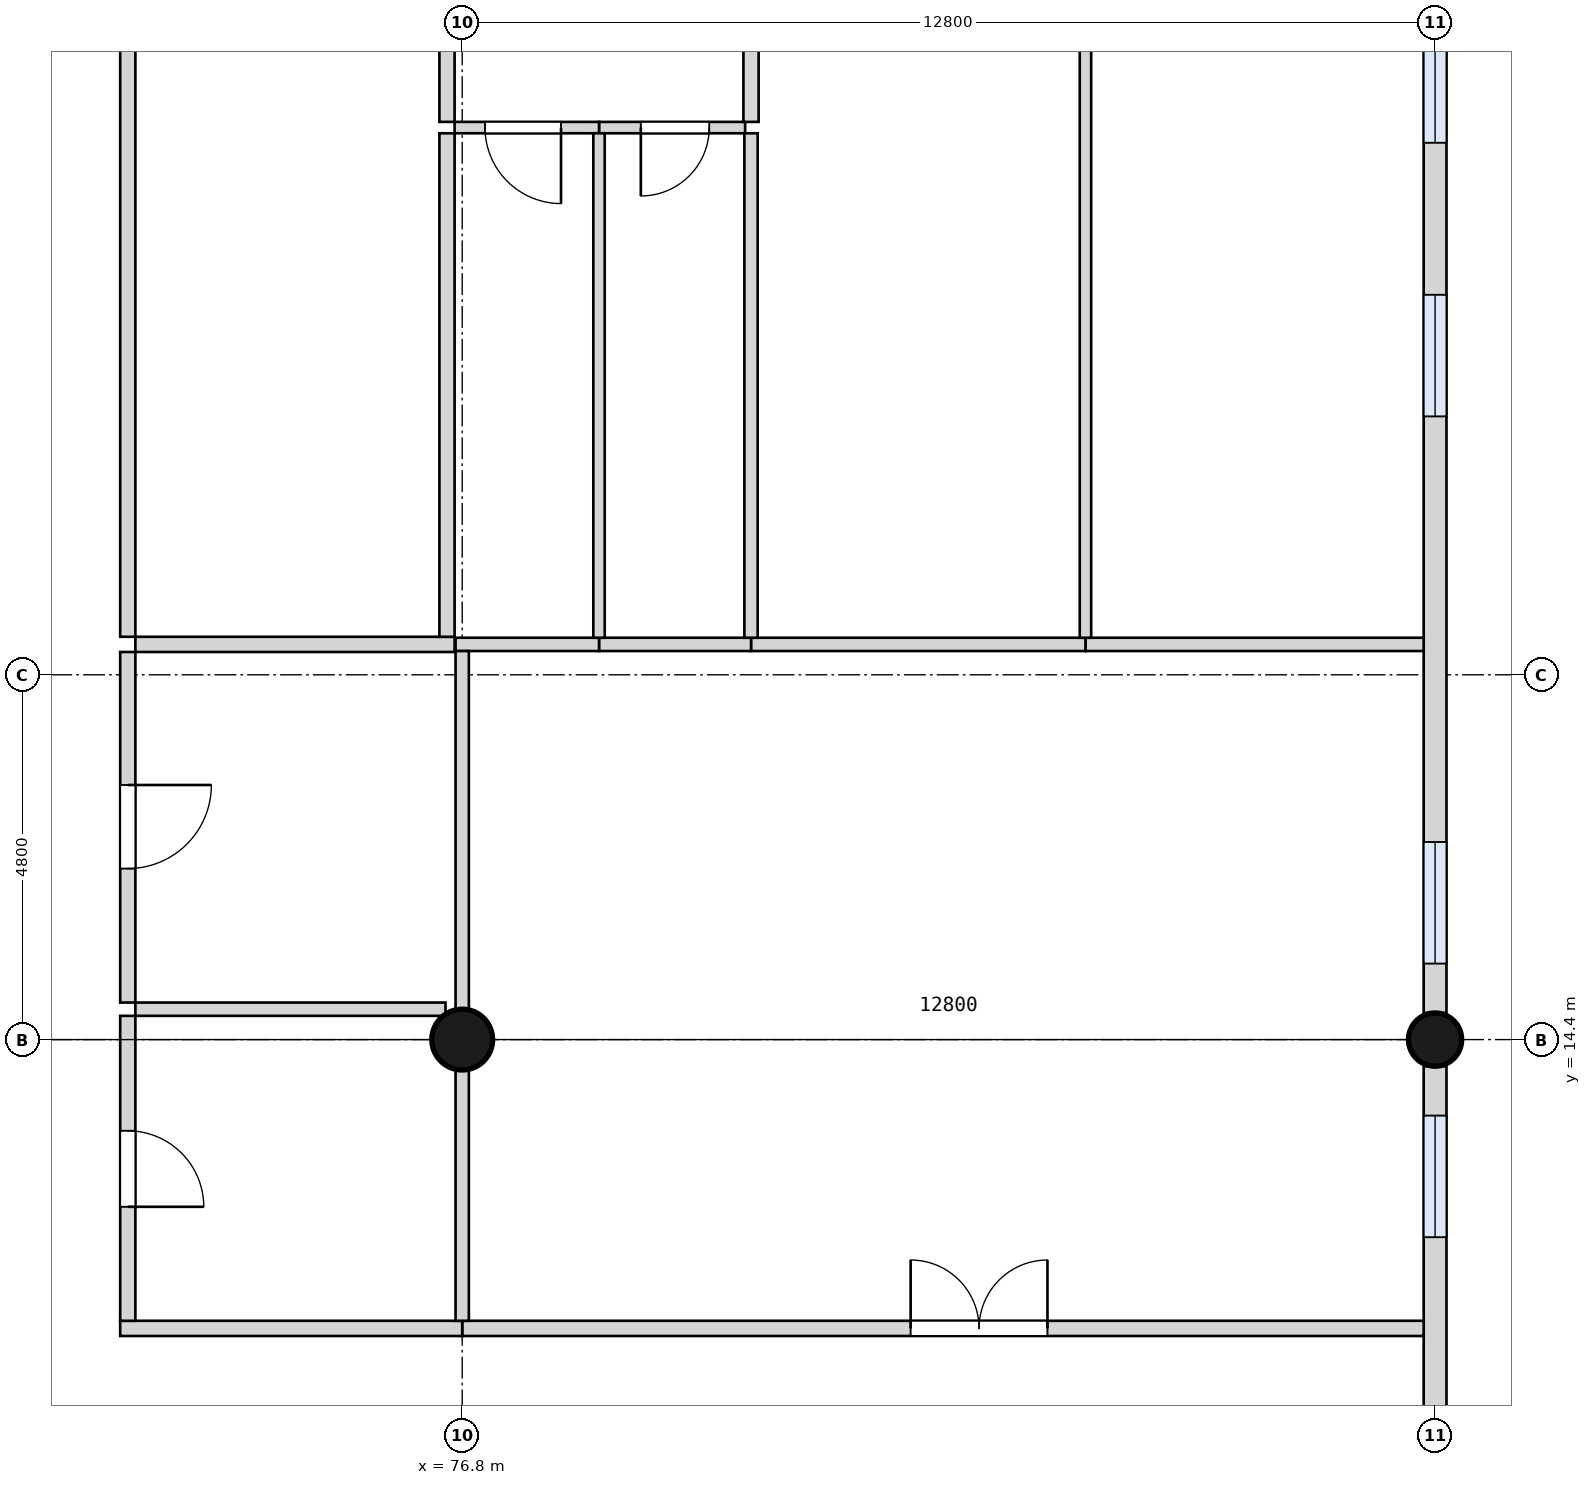
"""IFC4 building model, lengths in metres.
Left out: names, types, materials, properties, quantities, classifications, styles, units other than length and angle.
Written with IfcOpenShell. Run it as: python <this file> out.ifc"""

import sys

from ifc_helpers import new_model, si_unit, direction, frame, frame_2d, origin, origin_2d, place, context, subcontext, project, spatial, rectangle, circle, extrude, element, fill, save


model = new_model("IFC4")
c1 = context("Model", 3, precision=1e-05, world=origin(), true_north=direction((0.0, 1.0)))
c2 = subcontext(c1, "Body", "Model", "MODEL_VIEW")
j1 = project(units=[si_unit("LENGTHUNIT", "METRE"), si_unit("PLANEANGLEUNIT", "RADIAN")], contexts=[c1])
p1 = place(None, origin())
s1 = spatial("IfcSite", under=j1, at=p1, CompositionType="ELEMENT")
p2 = place(p1, origin())
s2 = spatial("IfcBuilding", under=s1, at=p2, CompositionType="ELEMENT")
p3 = place(p2, origin())
s3 = spatial("IfcBuildingStorey", under=s2, at=p3, CompositionType="ELEMENT", Elevation=0.0)
p4 = place(p3, frame((89.6, 14.4, 0.0), z_axis=(0.0, 0.0, 1.0), x_axis=(1.0, 0.0, 0.0)))
e1 = element("IfcColumn", 1, at=p4, inside=s3, PredefinedType="COLUMN", context=c2, shape_type="SweptSolid", body=[
    extrude(circle(Radius=0.35, at=origin_2d()), origin(), (0.0, 0.0, 1.0), 4.2),
])
p5 = place(p3, frame((76.8, 14.4, 0.0), z_axis=(0.0, 0.0, 1.0), x_axis=(1.0, 0.0, 0.0)))
e2 = element("IfcColumn", 2, at=p5, inside=s3, PredefinedType="COLUMN", context=c2, shape_type="SweptSolid", body=[
    extrude(circle(Radius=0.4, at=origin_2d()), origin(), (0.0, 0.0, 1.0), 4.2),
])
p6 = place(p3, frame((89.6, 0.35, 0.0), z_axis=(0.0, 0.0, 1.0), x_axis=(0.0, 1.0, 0.0)))
e3 = element("IfcWall", 3, at=p6, inside=s3, PredefinedType="SOLIDWALL", context=c2, shape_type="SweptSolid", body=[
    extrude(rectangle(XDim=13.7, YDim=0.3, at=frame_2d((6.85, 0.0))), origin(), (0.0, 0.0, 1.0), 3.0),
])
p7 = place(p6, frame((0.65, 0.0, 0.3)))
e4 = element("IfcOpeningElement", 4, at=p7, cuts=e3, PredefinedType="OPENING", context=c2, shape_type="SweptSolid", body=[
    extrude(rectangle(XDim=1.6, YDim=2.4, at=frame_2d((0.8, 1.2))), frame((0.0, 0.16, 0.0), z_axis=(0.0, -1.0, 0.0), x_axis=(1.0, 0.0, 0.0)), (0.0, 0.0, 1.0), 0.32),
])
p8 = place(p6, frame((4.25, 0.0, 0.3)))
e5 = element("IfcOpeningElement", 5, at=p8, cuts=e3, PredefinedType="OPENING", context=c2, shape_type="SweptSolid", body=[
    extrude(rectangle(XDim=1.6, YDim=2.4, at=frame_2d((0.8, 1.2))), frame((0.0, 0.16, 0.0), z_axis=(0.0, -1.0, 0.0), x_axis=(1.0, 0.0, 0.0)), (0.0, 0.0, 1.0), 0.32),
])
p9 = place(p6, frame((11.45, 0.0, 0.3)))
e6 = element("IfcOpeningElement", 6, at=p9, cuts=e3, PredefinedType="OPENING", context=c2, shape_type="SweptSolid", body=[
    extrude(rectangle(XDim=1.6, YDim=2.4, at=frame_2d((0.8, 1.2))), frame((0.0, 0.16, 0.0), z_axis=(0.0, -1.0, 0.0), x_axis=(1.0, 0.0, 0.0)), (0.0, 0.0, 1.0), 0.32),
])
p10 = place(p3, frame((89.6, 14.75, 0.0), z_axis=(0.0, 0.0, 1.0), x_axis=(0.0, 1.0, 0.0)))
e7 = element("IfcWall", 7, at=p10, inside=s3, PredefinedType="SOLIDWALL", context=c2, shape_type="SweptSolid", body=[
    extrude(rectangle(XDim=13.7, YDim=0.3, at=frame_2d((6.85, 0.0))), origin(), (0.0, 0.0, 1.0), 3.0),
])
p11 = place(p10, frame((0.65, 0.0, 0.3)))
e8 = element("IfcOpeningElement", 8, at=p11, cuts=e7, PredefinedType="OPENING", context=c2, shape_type="SweptSolid", body=[
    extrude(rectangle(XDim=1.6, YDim=2.4, at=frame_2d((0.8, 1.2))), frame((0.0, 0.16, 0.0), z_axis=(0.0, -1.0, 0.0), x_axis=(1.0, 0.0, 0.0)), (0.0, 0.0, 1.0), 0.32),
])
p12 = place(p10, frame((7.85, 0.0, 0.3)))
e9 = element("IfcOpeningElement", 9, at=p12, cuts=e7, PredefinedType="OPENING", context=c2, shape_type="SweptSolid", body=[
    extrude(rectangle(XDim=1.6, YDim=2.4, at=frame_2d((0.8, 1.2))), frame((0.0, 0.16, 0.0), z_axis=(0.0, -1.0, 0.0), x_axis=(1.0, 0.0, 0.0)), (0.0, 0.0, 1.0), 0.32),
])
p13 = place(p10, frame((11.45, 0.0, 0.3)))
e10 = element("IfcOpeningElement", 10, at=p13, cuts=e7, PredefinedType="OPENING", context=c2, shape_type="SweptSolid", body=[
    extrude(rectangle(XDim=1.6, YDim=2.4, at=frame_2d((0.8, 1.2))), frame((0.0, 0.16, 0.0), z_axis=(0.0, -1.0, 0.0), x_axis=(1.0, 0.0, 0.0)), (0.0, 0.0, 1.0), 0.32),
])
p14 = place(p3, frame((89.45, 10.6, 0.0), z_axis=(0.0, 0.0, 1.0), x_axis=(-1.0, 0.0, 0.0)))
e11 = element("IfcWall", 11, at=p14, inside=s3, PredefinedType="PARTITIONING", context=c2, shape_type="SweptSolid", body=[
    extrude(rectangle(XDim=12.65, YDim=0.2, at=frame_2d((6.325, 0.0))), origin(), (0.0, 0.0, 1.0), 3.9),
])
p15 = place(p14, frame((4.95, 0.0, 0.0)))
e12 = element("IfcOpeningElement", 12, at=p15, cuts=e11, PredefinedType="OPENING", context=c2, shape_type="SweptSolid", body=[
    extrude(rectangle(XDim=1.8, YDim=2.1, at=frame_2d((0.9, 1.05))), frame((0.0, 0.11, 0.0), z_axis=(0.0, -1.0, 0.0), x_axis=(1.0, 0.0, 0.0)), (0.0, 0.0, 1.0), 0.22),
])
p16 = place(p3, frame((76.8, 10.6, 0.0), z_axis=(0.0, 0.0, 1.0), x_axis=(-1.0, 0.0, 0.0)))
e13 = element("IfcWall", 13, at=p16, inside=s3, PredefinedType="PARTITIONING", context=c2, shape_type="SweptSolid", body=[
    extrude(rectangle(XDim=4.5, YDim=0.2, at=frame_2d((2.25, 0.0))), origin(), (0.0, 0.0, 1.0), 3.9),
])
p17 = place(p3, frame((76.581, 14.8, 0.0), z_axis=(0.0, 0.0, 1.0), x_axis=(-1.0, 0.0, 0.0)))
e14 = element("IfcWall", 14, at=p17, inside=s3, PredefinedType="PARTITIONING", context=c2, shape_type="SweptSolid", body=[
    extrude(rectangle(XDim=4.081, YDim=0.175, at=frame_2d((2.04, 0.0))), origin(), (0.0, 0.0, 1.0), 3.9),
])
p18 = place(p3, frame((89.45, 19.6, 0.0), z_axis=(0.0, 0.0, 1.0), x_axis=(-1.0, 0.0, 0.0)))
e15 = element("IfcWall", 15, at=p18, inside=s3, PredefinedType="PARTITIONING", context=c2, shape_type="SweptSolid", body=[
    extrude(rectangle(XDim=4.45, YDim=0.175, at=frame_2d((2.225, 0.0))), origin(), (0.0, 0.0, 1.0), 3.9),
])
p19 = place(p3, frame((85.0, 19.6, 0.0), z_axis=(0.0, 0.0, 1.0), x_axis=(-1.0, 0.0, 0.0)))
e16 = element("IfcWall", 16, at=p19, inside=s3, PredefinedType="PARTITIONING", context=c2, shape_type="SweptSolid", body=[
    extrude(rectangle(XDim=4.4, YDim=0.175, at=frame_2d((2.2, 0.0))), origin(), (0.0, 0.0, 1.0), 3.9),
])
p20 = place(p3, frame((80.6, 19.6, 0.0), z_axis=(0.0, 0.0, 1.0), x_axis=(-1.0, 0.0, 0.0)))
e17 = element("IfcWall", 17, at=p20, inside=s3, PredefinedType="PARTITIONING", context=c2, shape_type="SweptSolid", body=[
    extrude(rectangle(XDim=2.0, YDim=0.175, at=frame_2d((1.0, 0.0))), origin(), (0.0, 0.0, 1.0), 3.9),
])
p21 = place(p3, frame((78.6, 19.6, 0.0), z_axis=(0.0, 0.0, 1.0), x_axis=(-1.0, 0.0, 0.0)))
e18 = element("IfcWall", 18, at=p21, inside=s3, PredefinedType="PARTITIONING", context=c2, shape_type="SweptSolid", body=[
    extrude(rectangle(XDim=1.888, YDim=0.175, at=frame_2d((0.944, 0.0))), origin(), (0.0, 0.0, 1.0), 3.9),
])
p22 = place(p3, frame((76.7, 19.6, 0.0), z_axis=(0.0, 0.0, 1.0), x_axis=(-1.0, 0.0, 0.0)))
e19 = element("IfcWall", 19, at=p22, inside=s3, PredefinedType="PARTITIONING", context=c2, shape_type="SweptSolid", body=[
    extrude(rectangle(XDim=4.2, YDim=0.2, at=frame_2d((2.1, 0.0))), origin(), (0.0, 0.0, 1.0), 3.9),
])
p23 = place(p3, frame((80.522, 26.4, 0.0), z_axis=(0.0, 0.0, 1.0), x_axis=(-1.0, 0.0, 0.0)))
e20 = element("IfcWall", 20, at=p23, inside=s3, PredefinedType="PARTITIONING", context=c2, shape_type="SweptSolid", body=[
    extrude(rectangle(XDim=1.922, YDim=0.15, at=frame_2d((0.961, 0.0))), origin(), (0.0, 0.0, 1.0), 3.9),
])
p24 = place(p23, frame((0.472, 0.0, 0.0)))
e21 = element("IfcOpeningElement", 21, at=p24, cuts=e20, PredefinedType="OPENING", context=c2, shape_type="SweptSolid", body=[
    extrude(rectangle(XDim=0.9, YDim=2.1, at=frame_2d((0.45, 1.05))), frame((0.0, 0.085, 0.0), z_axis=(0.0, -1.0, 0.0), x_axis=(1.0, 0.0, 0.0)), (0.0, 0.0, 1.0), 0.17),
])
p25 = place(p3, frame((78.6, 26.4, 0.0), z_axis=(0.0, 0.0, 1.0), x_axis=(-1.0, 0.0, 0.0)))
e22 = element("IfcWall", 22, at=p25, inside=s3, PredefinedType="PARTITIONING", context=c2, shape_type="SweptSolid", body=[
    extrude(rectangle(XDim=1.9, YDim=0.15, at=frame_2d((0.95, 0.0))), origin(), (0.0, 0.0, 1.0), 3.9),
])
p26 = place(p25, frame((0.5, 0.0, 0.0)))
e23 = element("IfcOpeningElement", 23, at=p26, cuts=e22, PredefinedType="OPENING", context=c2, shape_type="SweptSolid", body=[
    extrude(rectangle(XDim=1.0, YDim=2.1, at=frame_2d((0.5, 1.05))), frame((0.0, 0.085, 0.0), z_axis=(0.0, -1.0, 0.0), x_axis=(1.0, 0.0, 0.0)), (0.0, 0.0, 1.0), 0.17),
])
p27 = place(p3, frame((85.0, 19.688, 0.0), z_axis=(0.0, 0.0, 1.0), x_axis=(0.0, 1.0, 0.0)))
e24 = element("IfcWall", 24, at=p27, inside=s3, PredefinedType="PARTITIONING", context=c2, shape_type="SweptSolid", body=[
    extrude(rectangle(XDim=9.012, YDim=0.15, at=frame_2d((4.506, 0.0))), origin(), (0.0, 0.0, 1.0), 3.9),
])
p28 = place(p3, frame((80.6, 19.688, 0.0), z_axis=(0.0, 0.0, 1.0), x_axis=(0.0, 1.0, 0.0)))
e25 = element("IfcWall", 25, at=p28, inside=s3, PredefinedType="PARTITIONING", context=c2, shape_type="SweptSolid", body=[
    extrude(rectangle(XDim=6.637, YDim=0.175, at=frame_2d((3.319, 0.0))), origin(), (0.0, 0.0, 1.0), 3.9),
])
p29 = place(p3, frame((80.6, 26.475, 0.0), z_axis=(0.0, 0.0, 1.0), x_axis=(0.0, 1.0, 0.0)))
e26 = element("IfcWall", 26, at=p29, inside=s3, PredefinedType="PARTITIONING", context=c2, shape_type="SweptSolid", body=[
    extrude(rectangle(XDim=2.225, YDim=0.2, at=frame_2d((1.112, 0.0))), origin(), (0.0, 0.0, 1.0), 3.9),
])
p30 = place(p3, frame((78.6, 19.688, 0.0), z_axis=(0.0, 0.0, 1.0), x_axis=(0.0, 1.0, 0.0)))
e27 = element("IfcWall", 27, at=p30, inside=s3, PredefinedType="PARTITIONING", context=c2, shape_type="SweptSolid", body=[
    extrude(rectangle(XDim=6.637, YDim=0.15, at=frame_2d((3.319, 0.0))), origin(), (0.0, 0.0, 1.0), 3.9),
])
p31 = place(p3, frame((76.8, 10.7, 0.0), z_axis=(0.0, 0.0, 1.0), x_axis=(0.0, 1.0, 0.0)))
e28 = element("IfcWall", 28, at=p31, inside=s3, PredefinedType="PARTITIONING", context=c2, shape_type="SweptSolid", body=[
    extrude(rectangle(XDim=3.3, YDim=0.175, at=frame_2d((1.65, 0.0))), origin(), (0.0, 0.0, 1.0), 3.0),
])
p32 = place(p3, frame((76.8, 14.8, 0.0), z_axis=(0.0, 0.0, 1.0), x_axis=(0.0, 1.0, 0.0)))
e29 = element("IfcWall", 29, at=p32, inside=s3, PredefinedType="PARTITIONING", context=c2, shape_type="SweptSolid", body=[
    extrude(rectangle(XDim=4.712, YDim=0.175, at=frame_2d((2.356, 0.0))), origin(), (0.0, 0.0, 1.0), 3.0),
])
p33 = place(p3, frame((76.6, 19.7, 0.0), z_axis=(0.0, 0.0, 1.0), x_axis=(0.0, 1.0, 0.0)))
e30 = element("IfcWall", 30, at=p33, inside=s3, PredefinedType="PARTITIONING", context=c2, shape_type="SweptSolid", body=[
    extrude(rectangle(XDim=6.625, YDim=0.2, at=frame_2d((3.312, 0.0))), origin(), (0.0, 0.0, 1.0), 3.0),
])
p34 = place(p3, frame((76.6, 26.475, 0.0), z_axis=(0.0, 0.0, 1.0), x_axis=(0.0, 1.0, 0.0)))
e31 = element("IfcWall", 31, at=p34, inside=s3, PredefinedType="PARTITIONING", context=c2, shape_type="SweptSolid", body=[
    extrude(rectangle(XDim=1.968, YDim=0.2, at=frame_2d((0.984, 0.0))), origin(), (0.0, 0.0, 1.0), 3.0),
])
p35 = place(p3, frame((72.4, 10.7, 0.0), z_axis=(0.0, 0.0, 1.0), x_axis=(0.0, 1.0, 0.0)))
e32 = element("IfcWall", 32, at=p35, inside=s3, PredefinedType="PARTITIONING", context=c2, shape_type="SweptSolid", body=[
    extrude(rectangle(XDim=4.012, YDim=0.2, at=frame_2d((2.006, 0.0))), origin(), (0.0, 0.0, 1.0), 3.9),
])
p36 = place(p35, frame((1.5, 0.0, 0.0)))
e33 = element("IfcOpeningElement", 33, at=p36, cuts=e32, PredefinedType="OPENING", context=c2, shape_type="SweptSolid", body=[
    extrude(rectangle(XDim=1.0, YDim=2.1, at=frame_2d((0.5, 1.05))), frame((0.0, 0.11, 0.0), z_axis=(0.0, -1.0, 0.0), x_axis=(1.0, 0.0, 0.0)), (0.0, 0.0, 1.0), 0.22),
])
p37 = place(p3, frame((72.4, 14.887, 0.0), z_axis=(0.0, 0.0, 1.0), x_axis=(0.0, 1.0, 0.0)))
e34 = element("IfcWall", 34, at=p37, inside=s3, PredefinedType="PARTITIONING", context=c2, shape_type="SweptSolid", body=[
    extrude(rectangle(XDim=4.613, YDim=0.2, at=frame_2d((2.306, 0.0))), origin(), (0.0, 0.0, 1.0), 3.9),
])
p38 = place(p37, frame((1.762, 0.0, 0.0)))
e35 = element("IfcOpeningElement", 35, at=p38, cuts=e34, PredefinedType="OPENING", context=c2, shape_type="SweptSolid", body=[
    extrude(rectangle(XDim=1.1, YDim=2.1, at=frame_2d((0.55, 1.05))), frame((0.0, 0.11, 0.0), z_axis=(0.0, -1.0, 0.0), x_axis=(1.0, 0.0, 0.0)), (0.0, 0.0, 1.0), 0.22),
])
p39 = place(p3, frame((72.4, 19.7, 0.0), z_axis=(0.0, 0.0, 1.0), x_axis=(0.0, 1.0, 0.0)))
e36 = element("IfcWall", 36, at=p39, inside=s3, PredefinedType="PARTITIONING", context=c2, shape_type="SweptSolid", body=[
    extrude(rectangle(XDim=9.0, YDim=0.2, at=frame_2d((4.5, 0.0))), origin(), (0.0, 0.0, 1.0), 3.9),
])
p40 = place(p15, frame((1.8, 0.0, 0.0), z_axis=(0.0, 0.0, 1.0), x_axis=(-1.0, 0.0, 0.0)))
e37 = element("IfcDoor", 37, at=p40, inside=s3, OperationType="DOUBLE_DOOR_SINGLE_SWING", PredefinedType="DOOR", context=c2, shape_type="SweptSolid", body=[
    extrude(rectangle(XDim=1.8, YDim=2.1, at=frame_2d((0.9, 1.05))), frame((0.0, 0.025, 0.0), z_axis=(0.0, -1.0, 0.0), x_axis=(1.0, 0.0, 0.0)), (0.0, 0.0, 1.0), 0.05),
])
fill(e12, e37)
p41 = place(p36, frame((1.0, 0.0, 0.0), z_axis=(0.0, 0.0, 1.0), x_axis=(-1.0, 0.0, 0.0)))
e38 = element("IfcDoor", 38, at=p41, inside=s3, OperationType="SINGLE_SWING_RIGHT", PredefinedType="DOOR", context=c2, shape_type="SweptSolid", body=[
    extrude(rectangle(XDim=1.0, YDim=2.1, at=frame_2d((0.5, 1.05))), frame((0.0, 0.025, 0.0), z_axis=(0.0, -1.0, 0.0), x_axis=(1.0, 0.0, 0.0)), (0.0, 0.0, 1.0), 0.05),
])
fill(e33, e38)
p42 = place(p38, frame((1.1, 0.0, 0.0), z_axis=(0.0, 0.0, 1.0), x_axis=(-1.0, 0.0, 0.0)))
e39 = element("IfcDoor", 39, at=p42, inside=s3, OperationType="SINGLE_SWING_LEFT", PredefinedType="DOOR", context=c2, shape_type="SweptSolid", body=[
    extrude(rectangle(XDim=1.1, YDim=2.1, at=frame_2d((0.55, 1.05))), frame((0.0, 0.025, 0.0), z_axis=(0.0, -1.0, 0.0), x_axis=(1.0, 0.0, 0.0)), (0.0, 0.0, 1.0), 0.05),
])
fill(e35, e39)
p43 = place(p24, origin())
e40 = element("IfcDoor", 40, at=p43, inside=s3, OperationType="SINGLE_SWING_RIGHT", PredefinedType="DOOR", context=c2, shape_type="SweptSolid", body=[
    extrude(rectangle(XDim=0.9, YDim=2.1, at=frame_2d((0.45, 1.05))), frame((0.0, 0.025, 0.0), z_axis=(0.0, -1.0, 0.0), x_axis=(1.0, 0.0, 0.0)), (0.0, 0.0, 1.0), 0.05),
])
fill(e21, e40)
p44 = place(p26, origin())
e41 = element("IfcDoor", 41, at=p44, inside=s3, OperationType="SINGLE_SWING_LEFT", PredefinedType="DOOR", context=c2, shape_type="SweptSolid", body=[
    extrude(rectangle(XDim=1.0, YDim=2.1, at=frame_2d((0.5, 1.05))), frame((0.0, 0.025, 0.0), z_axis=(0.0, -1.0, 0.0), x_axis=(1.0, 0.0, 0.0)), (0.0, 0.0, 1.0), 0.05),
])
fill(e23, e41)
p45 = place(p9, origin())
e42 = element("IfcWindow", 42, at=p45, inside=s3, PartitioningType="SINGLE_PANEL", PredefinedType="WINDOW", context=c2, shape_type="SweptSolid", body=[
    extrude(rectangle(XDim=1.6, YDim=2.4, at=frame_2d((0.8, 1.2))), frame((0.0, 0.03, 0.0), z_axis=(0.0, -1.0, 0.0), x_axis=(1.0, 0.0, 0.0)), (0.0, 0.0, 1.0), 0.06),
])
fill(e6, e42)
p46 = place(p11, origin())
e43 = element("IfcWindow", 43, at=p46, inside=s3, PartitioningType="SINGLE_PANEL", PredefinedType="WINDOW", context=c2, shape_type="SweptSolid", body=[
    extrude(rectangle(XDim=1.6, YDim=2.4, at=frame_2d((0.8, 1.2))), frame((0.0, 0.03, 0.0), z_axis=(0.0, -1.0, 0.0), x_axis=(1.0, 0.0, 0.0)), (0.0, 0.0, 1.0), 0.06),
])
fill(e8, e43)
p47 = place(p12, origin())
e44 = element("IfcWindow", 44, at=p47, inside=s3, PartitioningType="SINGLE_PANEL", PredefinedType="WINDOW", context=c2, shape_type="SweptSolid", body=[
    extrude(rectangle(XDim=1.6, YDim=2.4, at=frame_2d((0.8, 1.2))), frame((0.0, 0.03, 0.0), z_axis=(0.0, -1.0, 0.0), x_axis=(1.0, 0.0, 0.0)), (0.0, 0.0, 1.0), 0.06),
])
fill(e9, e44)
p48 = place(p13, origin())
e45 = element("IfcWindow", 45, at=p48, inside=s3, PartitioningType="SINGLE_PANEL", PredefinedType="WINDOW", context=c2, shape_type="SweptSolid", body=[
    extrude(rectangle(XDim=1.6, YDim=2.4, at=frame_2d((0.8, 1.2))), frame((0.0, 0.03, 0.0), z_axis=(0.0, -1.0, 0.0), x_axis=(1.0, 0.0, 0.0)), (0.0, 0.0, 1.0), 0.06),
])
fill(e10, e45)
save(model, sys.argv[1])
